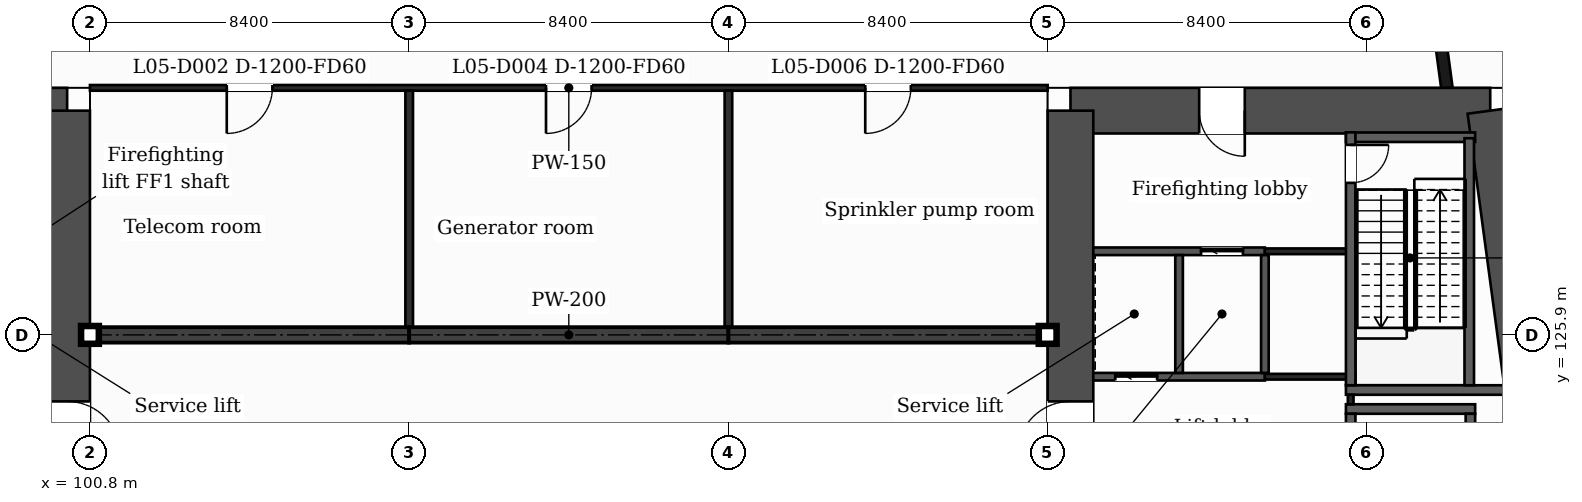
"""IFC4 building model, lengths in metres.
Left out: names, types, materials, properties, quantities, classifications, styles, units other than length and angle.
Written with IfcOpenShell. Run it as: python <this file> out.ifc"""

import sys

from ifc_helpers import new_model, si_unit, direction, frame, frame_2d, origin, place, context, subcontext, project, spatial, rectangle, extrude, element, fill, save


model = new_model("IFC4")
c1 = context("Model", 3, precision=1e-05, world=origin(), true_north=direction((0.0, 1.0)))
c2 = subcontext(c1, "Body", "Model", "MODEL_VIEW")
j1 = project(units=[si_unit("LENGTHUNIT", "METRE"), si_unit("PLANEANGLEUNIT", "RADIAN")], contexts=[c1])
p1 = place(None, origin())
s1 = spatial("IfcSite", under=j1, at=p1, CompositionType="ELEMENT")
p2 = place(p1, origin())
s2 = spatial("IfcBuilding", under=s1, at=p2, CompositionType="ELEMENT")
p3 = place(p2, frame((0.0, 0.0, 34.0)))
s3 = spatial("IfcBuildingStorey", under=s2, at=p3, CompositionType="ELEMENT", Elevation=34.0)
p4 = place(p3, frame((89.156, 131.8, 0.0), z_axis=(0.0, 0.0, 1.0), x_axis=(1.0, 0.0, 0.0)))
e1 = element("IfcWall", 1, at=p4, inside=s3, PredefinedType="SHEAR", context=c2, shape_type="SweptSolid", body=[
    extrude(rectangle(XDim=11.044, YDim=1.2, at=frame_2d((5.522, 0.0))), origin(), (0.0, 0.0, 1.0), 5.0),
])
p5 = place(p4, frame((6.458, 0.0, 0.0)))
e2 = element("IfcOpeningElement", 2, at=p5, cuts=e1, PredefinedType="OPENING", context=c2, shape_type="SweptSolid", body=[
    extrude(rectangle(XDim=1.2, YDim=2.1, at=frame_2d((0.6, 1.05))), frame((0.0, 0.61, 0.0), z_axis=(0.0, -1.0, 0.0), x_axis=(1.0, 0.0, 0.0)), (0.0, 0.0, 1.0), 1.22),
])
p6 = place(p3, frame((100.2, 131.8, 0.0), z_axis=(0.0, 0.0, 1.0), x_axis=(0.0, -1.0, 0.0)))
e3 = element("IfcWall", 3, at=p6, inside=s3, PredefinedType="SHEAR", context=c2, shape_type="SweptSolid", body=[
    extrude(rectangle(XDim=20.8, YDim=1.2, at=frame_2d((10.4, 0.0))), origin(), (0.0, 0.0, 1.0), 5.0),
])
p7 = place(p6, frame((7.65, 0.0, 0.0)))
e4 = element("IfcOpeningElement", 4, at=p7, cuts=e3, PredefinedType="OPENING", context=c2, shape_type="SweptSolid", body=[
    extrude(rectangle(XDim=1.4, YDim=2.1, at=frame_2d((0.7, 1.05))), frame((0.0, 0.61, 0.0), z_axis=(0.0, -1.0, 0.0), x_axis=(1.0, 0.0, 0.0)), (0.0, 0.0, 1.0), 1.22),
])
p8 = place(p3, frame((126.6, 131.8, 0.0), z_axis=(0.0, 0.0, 1.0), x_axis=(1.0, 0.0, 0.0)))
e5 = element("IfcWall", 5, at=p8, inside=s3, PredefinedType="SHEAR", context=c2, shape_type="SweptSolid", body=[
    extrude(rectangle(XDim=11.044, YDim=1.2, at=frame_2d((5.522, 0.0))), origin(), (0.0, 0.0, 1.0), 5.0),
])
p9 = place(p8, frame((3.386, 0.0, 0.0)))
e6 = element("IfcOpeningElement", 6, at=p9, cuts=e5, PredefinedType="OPENING", context=c2, shape_type="SweptSolid", body=[
    extrude(rectangle(XDim=1.2, YDim=2.1, at=frame_2d((0.6, 1.05))), frame((0.0, 0.61, 0.0), z_axis=(0.0, -1.0, 0.0), x_axis=(1.0, 0.0, 0.0)), (0.0, 0.0, 1.0), 1.22),
])
p10 = place(p3, frame((137.645, 131.8, 0.0), z_axis=(0.0, 0.0, 1.0), x_axis=(0.133413989637, -0.99106039542, 0.0)))
e7 = element("IfcWall", 7, at=p10, inside=s3, PredefinedType="SHEAR", context=c2, shape_type="SweptSolid", body=[
    extrude(rectangle(XDim=20.988, YDim=1.2, at=frame_2d((10.494, 0.0))), origin(), (0.0, 0.0, 1.0), 5.0),
])
p11 = place(p3, frame((126.6, 111.0, 0.0), z_axis=(0.0, 0.0, 1.0), x_axis=(0.0, 1.0, 0.0)))
e8 = element("IfcWall", 8, at=p11, inside=s3, PredefinedType="SHEAR", context=c2, shape_type="SweptSolid", body=[
    extrude(rectangle(XDim=20.8, YDim=1.2, at=frame_2d((10.4, 0.0))), origin(), (0.0, 0.0, 1.0), 5.0),
])
p12 = place(p11, frame((11.75, 0.0, 0.0)))
e9 = element("IfcOpeningElement", 9, at=p12, cuts=e8, PredefinedType="OPENING", context=c2, shape_type="SweptSolid", body=[
    extrude(rectangle(XDim=1.4, YDim=2.1, at=frame_2d((0.7, 1.05))), frame((0.0, 0.61, 0.0), z_axis=(0.0, -1.0, 0.0), x_axis=(1.0, 0.0, 0.0)), (0.0, 0.0, 1.0), 1.22),
])
p13 = place(p3, frame((136.504, 132.4, 0.0), z_axis=(0.0, 0.0, 1.0), x_axis=(-0.133399697462, 0.99106231929, 0.0)))
e10 = element("IfcWall", 10, at=p13, inside=s3, PredefinedType="SOLIDWALL", context=c2, shape_type="SweptSolid", body=[
    extrude(rectangle(XDim=6.74, YDim=0.3, at=frame_2d((3.37, 0.0))), origin(), (0.0, 0.0, 1.0), 4.68),
])
p14 = place(p3, frame((133.848, 123.95, 0.0), z_axis=(0.0, 0.0, 1.0), x_axis=(1.0, 0.0, 0.0)))
e11 = element("IfcWall", 11, at=p14, inside=s3, PredefinedType="PARTITIONING", context=c2, shape_type="SweptSolid", body=[
    extrude(rectangle(XDim=3.4, YDim=0.25, at=frame_2d((1.7, 0.0))), origin(), (0.0, 0.0, 1.0), 4.68),
])
p15 = place(p3, frame((133.848, 124.45, 0.0), z_axis=(0.0, 0.0, 1.0), x_axis=(1.0, 0.0, 0.0)))
e12 = element("IfcWall", 12, at=p15, inside=s3, PredefinedType="PARTITIONING", context=c2, shape_type="SweptSolid", body=[
    extrude(rectangle(XDim=4.211, YDim=0.25, at=frame_2d((2.105, 0.0))), origin(), (0.0, 0.0, 1.0), 4.68),
])
p16 = place(p3, frame((127.2, 124.8, 0.0), z_axis=(0.0, 0.0, 1.0), x_axis=(1.0, 0.0, 0.0)))
e13 = element("IfcWall", 13, at=p16, inside=s3, PredefinedType="PARTITIONING", context=c2, shape_type="SweptSolid", body=[
    extrude(rectangle(XDim=4.515, YDim=0.2, at=frame_2d((2.258, 0.0))), origin(), (0.0, 0.0, 1.0), 4.68),
])
p17 = place(p16, frame((0.579, 0.0, 0.0)))
e14 = element("IfcOpeningElement", 14, at=p17, cuts=e13, PredefinedType="OPENING", context=c2, shape_type="SweptSolid", body=[
    extrude(rectangle(XDim=1.1, YDim=2.1, at=frame_2d((0.55, 1.05))), frame((0.0, 0.11, 0.0), z_axis=(0.0, -1.0, 0.0), x_axis=(1.0, 0.0, 0.0)), (0.0, 0.0, 1.0), 0.22),
])
p18 = place(p3, frame((131.715, 124.8, 0.0), z_axis=(0.0, 0.0, 1.0), x_axis=(1.0, 0.0, 0.0)))
e15 = element("IfcWall", 15, at=p18, inside=s3, PredefinedType="PARTITIONING", context=c2, shape_type="SweptSolid", body=[
    extrude(rectangle(XDim=2.383, YDim=0.15, at=frame_2d((1.191, 0.0))), origin(), (0.0, 0.0, 1.0), 4.68),
])
p19 = place(p3, frame((100.8, 125.9, 0.0), z_axis=(0.0, 0.0, 1.0), x_axis=(1.0, 0.0, 0.0)))
e16 = element("IfcWall", 16, at=p19, inside=s3, PredefinedType="PARTITIONING", context=c2, shape_type="SweptSolid", body=[
    extrude(rectangle(XDim=25.2, YDim=0.2, at=frame_2d((12.6, 0.0))), origin(), (0.0, 0.0, 1.0), 4.68),
])
p20 = place(p3, frame((127.2, 128.1, 0.0), z_axis=(0.0, 0.0, 1.0), x_axis=(1.0, 0.0, 0.0)))
e17 = element("IfcWall", 17, at=p20, inside=s3, PredefinedType="PARTITIONING", context=c2, shape_type="SweptSolid", body=[
    extrude(rectangle(XDim=4.515, YDim=0.2, at=frame_2d((2.258, 0.0))), origin(), (0.0, 0.0, 1.0), 4.68),
])
p21 = place(p20, frame((2.837, 0.0, 0.0)))
e18 = element("IfcOpeningElement", 18, at=p21, cuts=e17, PredefinedType="OPENING", context=c2, shape_type="SweptSolid", body=[
    extrude(rectangle(XDim=1.1, YDim=2.1, at=frame_2d((0.55, 1.05))), frame((0.0, 0.11, 0.0), z_axis=(0.0, -1.0, 0.0), x_axis=(1.0, 0.0, 0.0)), (0.0, 0.0, 1.0), 0.22),
])
p22 = place(p3, frame((131.715, 128.1, 0.0), z_axis=(0.0, 0.0, 1.0), x_axis=(1.0, 0.0, 0.0)))
e19 = element("IfcWall", 19, at=p22, inside=s3, PredefinedType="PARTITIONING", context=c2, shape_type="SweptSolid", body=[
    extrude(rectangle(XDim=2.258, YDim=0.15, at=frame_2d((1.129, 0.0))), origin(), (0.0, 0.0, 1.0), 4.68),
])
p23 = place(p3, frame((133.848, 131.101, 0.0), z_axis=(0.0, 0.0, 1.0), x_axis=(1.0, 0.0, 0.0)))
e20 = element("IfcWall", 20, at=p23, inside=s3, PredefinedType="PARTITIONING", context=c2, shape_type="SweptSolid", body=[
    extrude(rectangle(XDim=3.4, YDim=0.25, at=frame_2d((1.7, 0.0))), origin(), (0.0, 0.0, 1.0), 4.68),
])
p24 = place(p3, frame((100.8, 132.4, 0.0), z_axis=(0.0, 0.0, 1.0), x_axis=(1.0, 0.0, 0.0)))
e21 = element("IfcWall", 21, at=p24, inside=s3, PredefinedType="PARTITIONING", context=c2, shape_type="SweptSolid", body=[
    extrude(rectangle(XDim=25.2, YDim=0.15, at=frame_2d((12.6, 0.0))), origin(), (0.0, 0.0, 1.0), 4.68),
])
p25 = place(p24, frame((3.6, 0.0, 0.0)))
e22 = element("IfcOpeningElement", 22, at=p25, cuts=e21, PredefinedType="OPENING", context=c2, shape_type="SweptSolid", body=[
    extrude(rectangle(XDim=1.2, YDim=2.1, at=frame_2d((0.6, 1.05))), frame((0.0, 0.085, 0.0), z_axis=(0.0, -1.0, 0.0), x_axis=(1.0, 0.0, 0.0)), (0.0, 0.0, 1.0), 0.17),
])
p26 = place(p24, frame((12.0, 0.0, 0.0)))
e23 = element("IfcOpeningElement", 23, at=p26, cuts=e21, PredefinedType="OPENING", context=c2, shape_type="SweptSolid", body=[
    extrude(rectangle(XDim=1.2, YDim=2.1, at=frame_2d((0.6, 1.05))), frame((0.0, 0.085, 0.0), z_axis=(0.0, -1.0, 0.0), x_axis=(1.0, 0.0, 0.0)), (0.0, 0.0, 1.0), 0.17),
])
p27 = place(p24, frame((20.4, 0.0, 0.0)))
e24 = element("IfcOpeningElement", 24, at=p27, cuts=e21, PredefinedType="OPENING", context=c2, shape_type="SweptSolid", body=[
    extrude(rectangle(XDim=1.2, YDim=2.1, at=frame_2d((0.6, 1.05))), frame((0.0, 0.085, 0.0), z_axis=(0.0, -1.0, 0.0), x_axis=(1.0, 0.0, 0.0)), (0.0, 0.0, 1.0), 0.17),
])
for number, where, z_axis, x_axis in (
    (25, (109.2, 126.0, 0.0), (0.0, 0.0, 1.0), (0.0, 1.0, 0.0)),
    (26, (117.6, 126.0, 0.0), (0.0, 0.0, 1.0), (0.0, 1.0, 0.0)),
):
    element("IfcWall", number, at=place(p3, frame(where, z_axis=z_axis, x_axis=x_axis)), inside=s3, PredefinedType="PARTITIONING", context=c2, shape_type="SweptSolid", body=[
        extrude(rectangle(XDim=6.325, YDim=0.2, at=frame_2d((3.163, 0.0))), origin(), (0.0, 0.0, 1.0), 4.68),
    ])
for number, where, z_axis, x_axis in (
    (27, (129.458, 124.9, 0.0), (0.0, 0.0, 1.0), (0.0, 1.0, 0.0)),
    (28, (131.715, 124.9, 0.0), (0.0, 0.0, 1.0), (0.0, 1.0, 0.0)),
):
    element("IfcWall", number, at=place(p3, frame(where, z_axis=z_axis, x_axis=x_axis)), inside=s3, PredefinedType="PARTITIONING", context=c2, shape_type="SweptSolid", body=[
        extrude(rectangle(XDim=3.1, YDim=0.2, at=frame_2d((1.55, 0.0))), origin(), (0.0, 0.0, 1.0), 4.68),
    ])
p28 = place(p3, frame((133.973, 124.075, 0.0), z_axis=(0.0, 0.0, 1.0), x_axis=(0.0, 1.0, 0.0)))
e29 = element("IfcWall", 29, at=p28, inside=s3, PredefinedType="PARTITIONING", context=c2, shape_type="SweptSolid", body=[
    extrude(rectangle(XDim=0.25, YDim=0.15, at=frame_2d((0.125, 0.0))), origin(), (0.0, 0.0, 1.0), 4.68),
])
p29 = place(p3, frame((133.973, 117.17, 0.0), z_axis=(0.0, 0.0, 1.0), x_axis=(0.0, 1.0, 0.0)))
e30 = element("IfcWall", 30, at=p29, inside=s3, PredefinedType="PARTITIONING", context=c2, shape_type="SweptSolid", body=[
    extrude(rectangle(XDim=6.655, YDim=0.25, at=frame_2d((3.328, 0.0))), origin(), (0.0, 0.0, 1.0), 4.68),
])
p30 = place(p29, frame((5.355, 0.0, 0.0)))
e31 = element("IfcOpeningElement", 31, at=p30, cuts=e30, PredefinedType="OPENING", context=c2, shape_type="SweptSolid", body=[
    extrude(rectangle(XDim=0.95, YDim=2.1, at=frame_2d((0.475, 1.05))), frame((0.0, 0.135, 0.0), z_axis=(0.0, -1.0, 0.0), x_axis=(1.0, 0.0, 0.0)), (0.0, 0.0, 1.0), 0.27),
])
p31 = place(p3, frame((133.973, 124.575, 0.0), z_axis=(0.0, 0.0, 1.0), x_axis=(0.0, 1.0, 0.0)))
e32 = element("IfcWall", 32, at=p31, inside=s3, PredefinedType="PARTITIONING", context=c2, shape_type="SweptSolid", body=[
    extrude(rectangle(XDim=6.655, YDim=0.25, at=frame_2d((3.328, 0.0))), origin(), (0.0, 0.0, 1.0), 4.68),
])
p32 = place(p31, frame((5.325, 0.0, 0.0)))
e33 = element("IfcOpeningElement", 33, at=p32, cuts=e32, PredefinedType="OPENING", context=c2, shape_type="SweptSolid", body=[
    extrude(rectangle(XDim=1.0, YDim=2.1, at=frame_2d((0.5, 1.05))), frame((0.0, 0.135, 0.0), z_axis=(0.0, -1.0, 0.0), x_axis=(1.0, 0.0, 0.0)), (0.0, 0.0, 1.0), 0.27),
])
p33 = place(p3, frame((137.123, 117.17, 0.0), z_axis=(0.0, 0.0, 1.0), x_axis=(0.0, 1.0, 0.0)))
e34 = element("IfcWall", 34, at=p33, inside=s3, PredefinedType="PARTITIONING", context=c2, shape_type="SweptSolid", body=[
    extrude(rectangle(XDim=6.655, YDim=0.25, at=frame_2d((3.328, 0.0))), origin(), (0.0, 0.0, 1.0), 4.68),
])
p34 = place(p3, frame((137.093, 124.575, 0.0), z_axis=(0.0, 0.0, 1.0), x_axis=(0.0, 1.0, 0.0)))
e35 = element("IfcWall", 35, at=p34, inside=s3, PredefinedType="PARTITIONING", context=c2, shape_type="SweptSolid", body=[
    extrude(rectangle(XDim=6.5, YDim=0.25, at=frame_2d((3.25, 0.0))), origin(), (0.0, 0.0, 1.0), 4.68),
])
p35 = place(p25, origin())
e36 = element("IfcDoor", 36, at=p35, inside=s3, OperationType="SINGLE_SWING_LEFT", PredefinedType="DOOR", context=c2, shape_type="SweptSolid", body=[
    extrude(rectangle(XDim=1.2, YDim=2.1, at=frame_2d((0.6, 1.05))), frame((0.0, 0.025, 0.0), z_axis=(0.0, -1.0, 0.0), x_axis=(1.0, 0.0, 0.0)), (0.0, 0.0, 1.0), 0.05),
])
fill(e22, e36)
p36 = place(p26, origin())
e37 = element("IfcDoor", 37, at=p36, inside=s3, OperationType="SINGLE_SWING_LEFT", PredefinedType="DOOR", context=c2, shape_type="SweptSolid", body=[
    extrude(rectangle(XDim=1.2, YDim=2.1, at=frame_2d((0.6, 1.05))), frame((0.0, 0.025, 0.0), z_axis=(0.0, -1.0, 0.0), x_axis=(1.0, 0.0, 0.0)), (0.0, 0.0, 1.0), 0.05),
])
fill(e23, e37)
p37 = place(p27, origin())
e38 = element("IfcDoor", 38, at=p37, inside=s3, OperationType="SINGLE_SWING_LEFT", PredefinedType="DOOR", context=c2, shape_type="SweptSolid", body=[
    extrude(rectangle(XDim=1.2, YDim=2.1, at=frame_2d((0.6, 1.05))), frame((0.0, 0.025, 0.0), z_axis=(0.0, -1.0, 0.0), x_axis=(1.0, 0.0, 0.0)), (0.0, 0.0, 1.0), 0.05),
])
fill(e24, e38)
p38 = place(p21, origin())
e39 = element("IfcDoor", 39, at=p38, inside=s3, OperationType="SLIDING_TO_LEFT", PredefinedType="DOOR", context=c2, shape_type="SweptSolid", body=[
    extrude(rectangle(XDim=1.1, YDim=2.1, at=frame_2d((0.55, 1.05))), frame((0.0, 0.025, 0.0), z_axis=(0.0, -1.0, 0.0), x_axis=(1.0, 0.0, 0.0)), (0.0, 0.0, 1.0), 0.05),
])
fill(e18, e39)
p39 = place(p17, origin())
e40 = element("IfcDoor", 40, at=p39, inside=s3, OperationType="SLIDING_TO_LEFT", PredefinedType="DOOR", context=c2, shape_type="SweptSolid", body=[
    extrude(rectangle(XDim=1.1, YDim=2.1, at=frame_2d((0.55, 1.05))), frame((0.0, 0.025, 0.0), z_axis=(0.0, -1.0, 0.0), x_axis=(1.0, 0.0, 0.0)), (0.0, 0.0, 1.0), 0.05),
])
fill(e14, e40)
p40 = place(p32, origin())
e41 = element("IfcDoor", 41, at=p40, inside=s3, OperationType="SINGLE_SWING_RIGHT", PredefinedType="DOOR", context=c2, shape_type="SweptSolid", body=[
    extrude(rectangle(XDim=1.0, YDim=2.1, at=frame_2d((0.5, 1.05))), frame((0.0, 0.025, 0.0), z_axis=(0.0, -1.0, 0.0), x_axis=(1.0, 0.0, 0.0)), (0.0, 0.0, 1.0), 0.05),
])
fill(e33, e41)
p41 = place(p7, origin())
e42 = element("IfcDoor", 42, at=p41, inside=s3, OperationType="SINGLE_SWING_RIGHT", PredefinedType="DOOR", context=c2, shape_type="SweptSolid", body=[
    extrude(rectangle(XDim=1.4, YDim=2.1, at=frame_2d((0.7, 1.05))), frame((0.0, 0.025, 0.0), z_axis=(0.0, -1.0, 0.0), x_axis=(1.0, 0.0, 0.0)), (0.0, 0.0, 1.0), 0.05),
])
fill(e4, e42)
p42 = place(p9, origin())
e43 = element("IfcDoor", 43, at=p42, inside=s3, OperationType="SINGLE_SWING_RIGHT", PredefinedType="DOOR", context=c2, shape_type="SweptSolid", body=[
    extrude(rectangle(XDim=1.2, YDim=2.1, at=frame_2d((0.6, 1.05))), frame((0.0, 0.025, 0.0), z_axis=(0.0, -1.0, 0.0), x_axis=(1.0, 0.0, 0.0)), (0.0, 0.0, 1.0), 0.05),
])
fill(e6, e43)
p43 = place(p12, origin())
e44 = element("IfcDoor", 44, at=p43, inside=s3, OperationType="SINGLE_SWING_LEFT", PredefinedType="DOOR", context=c2, shape_type="SweptSolid", body=[
    extrude(rectangle(XDim=1.4, YDim=2.1, at=frame_2d((0.7, 1.05))), frame((0.0, 0.025, 0.0), z_axis=(0.0, -1.0, 0.0), x_axis=(1.0, 0.0, 0.0)), (0.0, 0.0, 1.0), 0.05),
])
fill(e9, e44)
save(model, sys.argv[1])
